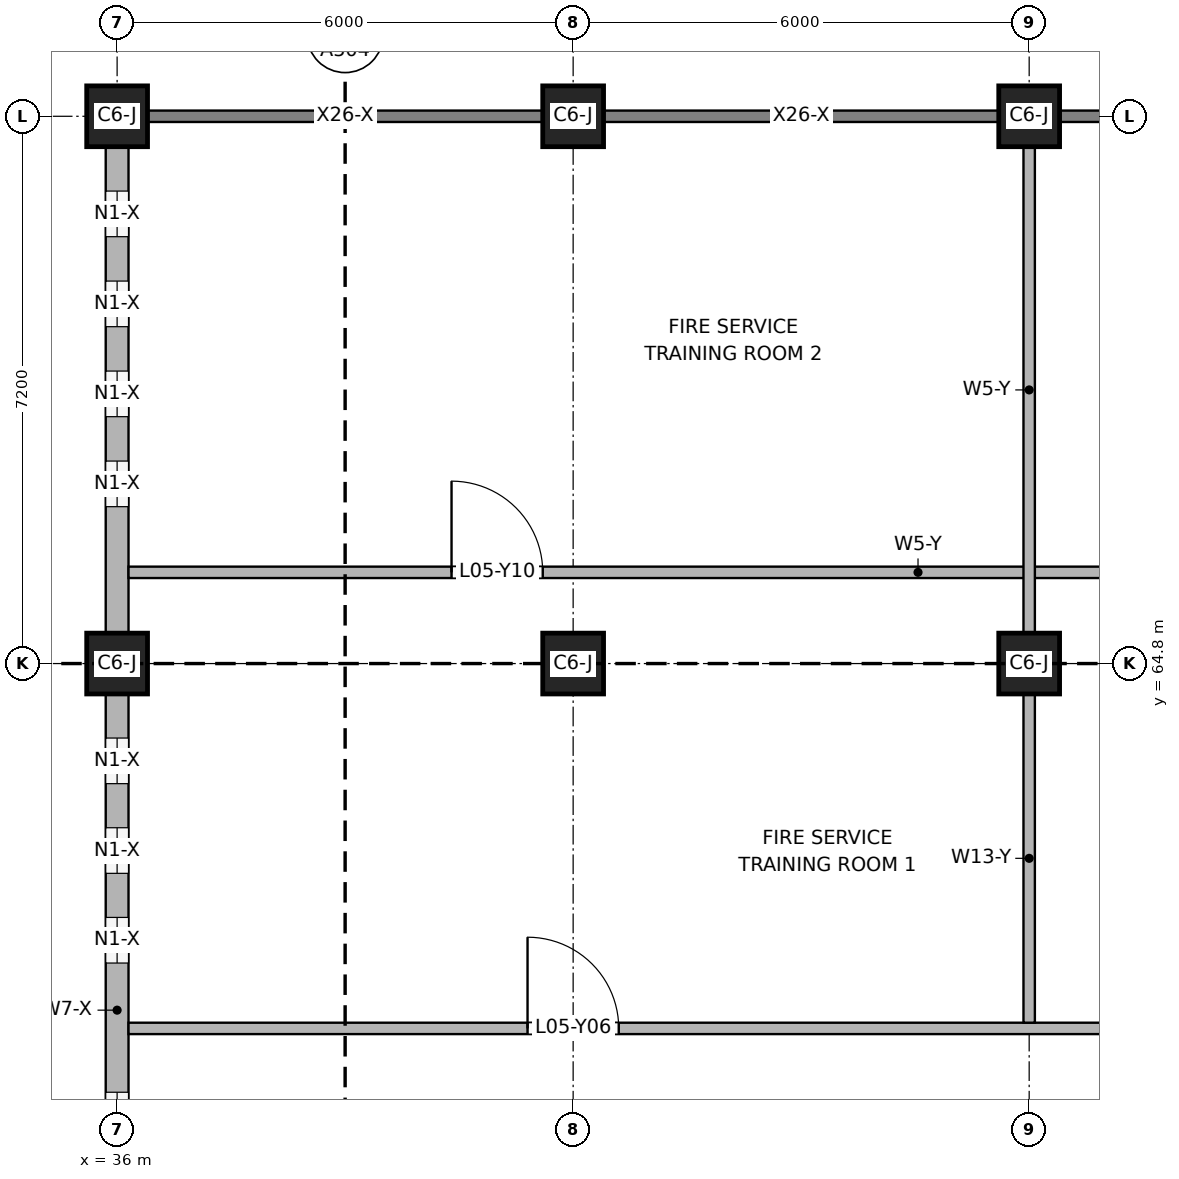
"""IFC4 building model, lengths in metres.
Left out: names, types, materials, properties, quantities, classifications, styles, units other than length and angle.
Written with IfcOpenShell. Run it as: python <this file> out.ifc"""

import sys

from ifc_helpers import new_model, si_unit, direction, frame, frame_2d, origin, origin_2d, place, context, subcontext, project, spatial, rectangle, extrude, element, fill, save


model = new_model("IFC4")
c1 = context("Model", 3, precision=1e-05, world=origin(), true_north=direction((0.0, 1.0)))
c2 = subcontext(c1, "Body", "Model", "MODEL_VIEW")
j1 = project(units=[si_unit("LENGTHUNIT", "METRE"), si_unit("PLANEANGLEUNIT", "RADIAN")], contexts=[c1])
p1 = place(None, origin())
s1 = spatial("IfcSite", under=j1, at=p1, CompositionType="ELEMENT")
p2 = place(p1, origin())
s2 = spatial("IfcBuilding", under=s1, at=p2, CompositionType="ELEMENT")
p3 = place(p2, frame((0.0, 0.0, 21.0)))
s3 = spatial("IfcBuildingStorey", under=s2, at=p3, CompositionType="ELEMENT", Elevation=21.0)
for number, where, z_axis, x_axis in (
    (1, (36.0, 64.8, 0.0), (0.0, 0.0, 1.0), (1.0, 0.0, 0.0)),
    (2, (42.0, 64.8, 0.0), (0.0, 0.0, 1.0), (1.0, 0.0, 0.0)),
    (3, (48.0, 64.8, 0.0), (0.0, 0.0, 1.0), (1.0, 0.0, 0.0)),
    (4, (36.0, 72.0, 0.0), (0.0, 0.0, 1.0), (1.0, 0.0, 0.0)),
    (5, (42.0, 72.0, 0.0), (0.0, 0.0, 1.0), (1.0, 0.0, 0.0)),
    (6, (48.0, 72.0, 0.0), (0.0, 0.0, 1.0), (1.0, 0.0, 0.0)),
):
    element("IfcColumn", number, at=place(p3, frame(where, z_axis=z_axis, x_axis=x_axis)), inside=s3, PredefinedType="COLUMN", context=c2, shape_type="SweptSolid", body=[
        extrude(rectangle(XDim=0.8, YDim=0.8, at=origin_2d()), origin(), (0.0, 0.0, 1.0), 3.95),
    ])
p4 = place(p3, frame((36.0, 58.0, 0.0), z_axis=(0.0, 0.0, 1.0), x_axis=(0.0, 1.0, 0.0)))
e7 = element("IfcWall", 7, at=p4, inside=s3, PredefinedType="SOLIDWALL", context=c2, shape_type="SweptSolid", body=[
    extrude(rectangle(XDim=6.4, YDim=0.3, at=frame_2d((3.2, 0.0))), origin(), (0.0, 0.0, 1.0), 3.15),
])
p5 = place(p4, frame((0.56, 0.0, 0.9)))
e8 = element("IfcOpeningElement", 8, at=p5, cuts=e7, PredefinedType="OPENING", context=c2, shape_type="SweptSolid", body=[
    extrude(rectangle(XDim=0.6, YDim=1.9, at=frame_2d((0.3, 0.95))), frame((0.0, 0.16, 0.0), z_axis=(0.0, -1.0, 0.0), x_axis=(1.0, 0.0, 0.0)), (0.0, 0.0, 1.0), 0.32),
])
p6 = place(p4, frame((2.86, 0.0, 0.9)))
e9 = element("IfcOpeningElement", 9, at=p6, cuts=e7, PredefinedType="OPENING", context=c2, shape_type="SweptSolid", body=[
    extrude(rectangle(XDim=0.6, YDim=1.9, at=frame_2d((0.3, 0.95))), frame((0.0, 0.16, 0.0), z_axis=(0.0, -1.0, 0.0), x_axis=(1.0, 0.0, 0.0)), (0.0, 0.0, 1.0), 0.32),
])
p7 = place(p4, frame((4.04, 0.0, 0.9)))
e10 = element("IfcOpeningElement", 10, at=p7, cuts=e7, PredefinedType="OPENING", context=c2, shape_type="SweptSolid", body=[
    extrude(rectangle(XDim=0.6, YDim=1.9, at=frame_2d((0.3, 0.95))), frame((0.0, 0.16, 0.0), z_axis=(0.0, -1.0, 0.0), x_axis=(1.0, 0.0, 0.0)), (0.0, 0.0, 1.0), 0.32),
])
p8 = place(p4, frame((5.22, 0.0, 0.9)))
e11 = element("IfcOpeningElement", 11, at=p8, cuts=e7, PredefinedType="OPENING", context=c2, shape_type="SweptSolid", body=[
    extrude(rectangle(XDim=0.6, YDim=1.9, at=frame_2d((0.3, 0.95))), frame((0.0, 0.16, 0.0), z_axis=(0.0, -1.0, 0.0), x_axis=(1.0, 0.0, 0.0)), (0.0, 0.0, 1.0), 0.32),
])
p9 = place(p3, frame((36.0, 65.2, 0.0), z_axis=(0.0, 0.0, 1.0), x_axis=(0.0, 1.0, 0.0)))
e12 = element("IfcWall", 12, at=p9, inside=s3, PredefinedType="SOLIDWALL", context=c2, shape_type="SweptSolid", body=[
    extrude(rectangle(XDim=6.4, YDim=0.3, at=frame_2d((3.2, 0.0))), origin(), (0.0, 0.0, 1.0), 3.15),
])
p10 = place(p9, frame((1.664, 0.0, 0.9)))
e13 = element("IfcOpeningElement", 13, at=p10, cuts=e12, PredefinedType="OPENING", context=c2, shape_type="SweptSolid", body=[
    extrude(rectangle(XDim=0.6, YDim=1.9, at=frame_2d((0.3, 0.95))), frame((0.0, 0.16, 0.0), z_axis=(0.0, -1.0, 0.0), x_axis=(1.0, 0.0, 0.0)), (0.0, 0.0, 1.0), 0.32),
])
p11 = place(p9, frame((2.848, 0.0, 0.9)))
e14 = element("IfcOpeningElement", 14, at=p11, cuts=e12, PredefinedType="OPENING", context=c2, shape_type="SweptSolid", body=[
    extrude(rectangle(XDim=0.6, YDim=1.9, at=frame_2d((0.3, 0.95))), frame((0.0, 0.16, 0.0), z_axis=(0.0, -1.0, 0.0), x_axis=(1.0, 0.0, 0.0)), (0.0, 0.0, 1.0), 0.32),
])
p12 = place(p9, frame((4.032, 0.0, 0.9)))
e15 = element("IfcOpeningElement", 15, at=p12, cuts=e12, PredefinedType="OPENING", context=c2, shape_type="SweptSolid", body=[
    extrude(rectangle(XDim=0.6, YDim=1.9, at=frame_2d((0.3, 0.95))), frame((0.0, 0.16, 0.0), z_axis=(0.0, -1.0, 0.0), x_axis=(1.0, 0.0, 0.0)), (0.0, 0.0, 1.0), 0.32),
])
p13 = place(p9, frame((5.216, 0.0, 0.9)))
e16 = element("IfcOpeningElement", 16, at=p13, cuts=e12, PredefinedType="OPENING", context=c2, shape_type="SweptSolid", body=[
    extrude(rectangle(XDim=0.6, YDim=1.9, at=frame_2d((0.3, 0.95))), frame((0.0, 0.16, 0.0), z_axis=(0.0, -1.0, 0.0), x_axis=(1.0, 0.0, 0.0)), (0.0, 0.0, 1.0), 0.32),
])
p14 = place(p3, frame((48.0, 60.075, 0.0), z_axis=(0.0, 0.0, 1.0), x_axis=(0.0, 1.0, 0.0)))
e17 = element("IfcWall", 17, at=p14, inside=s3, PredefinedType="PARTITIONING", context=c2, shape_type="SweptSolid", body=[
    extrude(rectangle(XDim=4.325, YDim=0.15, at=frame_2d((2.163, 0.0))), origin(), (0.0, 0.0, 1.0), 3.95),
])
p15 = place(p3, frame((48.0, 65.2, 0.0), z_axis=(0.0, 0.0, 1.0), x_axis=(0.0, 1.0, 0.0)))
e18 = element("IfcWall", 18, at=p15, inside=s3, PredefinedType="PARTITIONING", context=c2, shape_type="SweptSolid", body=[
    extrude(rectangle(XDim=6.4, YDim=0.15, at=frame_2d((3.2, 0.0))), origin(), (0.0, 0.0, 1.0), 3.15),
])
p16 = place(p3, frame((36.15, 60.0, 0.0), z_axis=(0.0, 0.0, 1.0), x_axis=(1.0, 0.0, 0.0)))
e19 = element("IfcWall", 19, at=p16, inside=s3, PredefinedType="PARTITIONING", context=c2, shape_type="SweptSolid", body=[
    extrude(rectangle(XDim=29.775, YDim=0.15, at=frame_2d((14.888, 0.0))), origin(), (0.0, 0.0, 1.0), 3.15),
])
p17 = place(p16, frame((5.25, 0.0, 0.0)))
e20 = element("IfcOpeningElement", 20, at=p17, cuts=e19, PredefinedType="OPENING", context=c2, shape_type="SweptSolid", body=[
    extrude(rectangle(XDim=1.2, YDim=2.1, at=frame_2d((0.6, 1.05))), frame((0.0, 0.085, 0.0), z_axis=(0.0, -1.0, 0.0), x_axis=(1.0, 0.0, 0.0)), (0.0, 0.0, 1.0), 0.17),
])
p18 = place(p16, frame((15.75, 0.0, 0.0)))
e21 = element("IfcOpeningElement", 21, at=p18, cuts=e19, PredefinedType="OPENING", context=c2, shape_type="SweptSolid", body=[
    extrude(rectangle(XDim=1.2, YDim=2.1, at=frame_2d((0.6, 1.05))), frame((0.0, 0.085, 0.0), z_axis=(0.0, -1.0, 0.0), x_axis=(1.0, 0.0, 0.0)), (0.0, 0.0, 1.0), 0.17),
])
p19 = place(p16, frame((24.75, 0.0, 0.0)))
e22 = element("IfcOpeningElement", 22, at=p19, cuts=e19, PredefinedType="OPENING", context=c2, shape_type="SweptSolid", body=[
    extrude(rectangle(XDim=1.2, YDim=2.1, at=frame_2d((0.6, 1.05))), frame((0.0, 0.085, 0.0), z_axis=(0.0, -1.0, 0.0), x_axis=(1.0, 0.0, 0.0)), (0.0, 0.0, 1.0), 0.17),
])
p20 = place(p3, frame((36.15, 66.0, 0.0), z_axis=(0.0, 0.0, 1.0), x_axis=(1.0, 0.0, 0.0)))
e23 = element("IfcWall", 23, at=p20, inside=s3, PredefinedType="PARTITIONING", context=c2, shape_type="SweptSolid", body=[
    extrude(rectangle(XDim=20.775, YDim=0.15, at=frame_2d((10.388, 0.0))), origin(), (0.0, 0.0, 1.0), 3.15),
])
p21 = place(p20, frame((4.25, 0.0, 0.0)))
e24 = element("IfcOpeningElement", 24, at=p21, cuts=e23, PredefinedType="OPENING", context=c2, shape_type="SweptSolid", body=[
    extrude(rectangle(XDim=1.2, YDim=2.1, at=frame_2d((0.6, 1.05))), frame((0.0, 0.085, 0.0), z_axis=(0.0, -1.0, 0.0), x_axis=(1.0, 0.0, 0.0)), (0.0, 0.0, 1.0), 0.17),
])
p22 = place(p20, frame((15.75, 0.0, 0.0)))
e25 = element("IfcOpeningElement", 25, at=p22, cuts=e23, PredefinedType="OPENING", context=c2, shape_type="SweptSolid", body=[
    extrude(rectangle(XDim=1.2, YDim=2.1, at=frame_2d((0.6, 1.05))), frame((0.0, 0.085, 0.0), z_axis=(0.0, -1.0, 0.0), x_axis=(1.0, 0.0, 0.0)), (0.0, 0.0, 1.0), 0.17),
])
p23 = place(p5, origin())
e26 = element("IfcWindow", 26, at=p23, inside=s3, PartitioningType="SINGLE_PANEL", PredefinedType="WINDOW", context=c2, shape_type="SweptSolid", body=[
    extrude(rectangle(XDim=0.6, YDim=1.9, at=frame_2d((0.3, 0.95))), frame((0.0, 0.03, 0.0), z_axis=(0.0, -1.0, 0.0), x_axis=(1.0, 0.0, 0.0)), (0.0, 0.0, 1.0), 0.06),
])
fill(e8, e26)
p24 = place(p6, origin())
e27 = element("IfcWindow", 27, at=p24, inside=s3, PartitioningType="SINGLE_PANEL", PredefinedType="WINDOW", context=c2, shape_type="SweptSolid", body=[
    extrude(rectangle(XDim=0.6, YDim=1.9, at=frame_2d((0.3, 0.95))), frame((0.0, 0.03, 0.0), z_axis=(0.0, -1.0, 0.0), x_axis=(1.0, 0.0, 0.0)), (0.0, 0.0, 1.0), 0.06),
])
fill(e9, e27)
p25 = place(p7, origin())
e28 = element("IfcWindow", 28, at=p25, inside=s3, PartitioningType="SINGLE_PANEL", PredefinedType="WINDOW", context=c2, shape_type="SweptSolid", body=[
    extrude(rectangle(XDim=0.6, YDim=1.9, at=frame_2d((0.3, 0.95))), frame((0.0, 0.03, 0.0), z_axis=(0.0, -1.0, 0.0), x_axis=(1.0, 0.0, 0.0)), (0.0, 0.0, 1.0), 0.06),
])
fill(e10, e28)
p26 = place(p8, origin())
e29 = element("IfcWindow", 29, at=p26, inside=s3, PartitioningType="SINGLE_PANEL", PredefinedType="WINDOW", context=c2, shape_type="SweptSolid", body=[
    extrude(rectangle(XDim=0.6, YDim=1.9, at=frame_2d((0.3, 0.95))), frame((0.0, 0.03, 0.0), z_axis=(0.0, -1.0, 0.0), x_axis=(1.0, 0.0, 0.0)), (0.0, 0.0, 1.0), 0.06),
])
fill(e11, e29)
p27 = place(p10, origin())
e30 = element("IfcWindow", 30, at=p27, inside=s3, PartitioningType="SINGLE_PANEL", PredefinedType="WINDOW", context=c2, shape_type="SweptSolid", body=[
    extrude(rectangle(XDim=0.6, YDim=1.9, at=frame_2d((0.3, 0.95))), frame((0.0, 0.03, 0.0), z_axis=(0.0, -1.0, 0.0), x_axis=(1.0, 0.0, 0.0)), (0.0, 0.0, 1.0), 0.06),
])
fill(e13, e30)
p28 = place(p11, origin())
e31 = element("IfcWindow", 31, at=p28, inside=s3, PartitioningType="SINGLE_PANEL", PredefinedType="WINDOW", context=c2, shape_type="SweptSolid", body=[
    extrude(rectangle(XDim=0.6, YDim=1.9, at=frame_2d((0.3, 0.95))), frame((0.0, 0.03, 0.0), z_axis=(0.0, -1.0, 0.0), x_axis=(1.0, 0.0, 0.0)), (0.0, 0.0, 1.0), 0.06),
])
fill(e14, e31)
p29 = place(p12, origin())
e32 = element("IfcWindow", 32, at=p29, inside=s3, PartitioningType="SINGLE_PANEL", PredefinedType="WINDOW", context=c2, shape_type="SweptSolid", body=[
    extrude(rectangle(XDim=0.6, YDim=1.9, at=frame_2d((0.3, 0.95))), frame((0.0, 0.03, 0.0), z_axis=(0.0, -1.0, 0.0), x_axis=(1.0, 0.0, 0.0)), (0.0, 0.0, 1.0), 0.06),
])
fill(e15, e32)
p30 = place(p13, origin())
e33 = element("IfcWindow", 33, at=p30, inside=s3, PartitioningType="SINGLE_PANEL", PredefinedType="WINDOW", context=c2, shape_type="SweptSolid", body=[
    extrude(rectangle(XDim=0.6, YDim=1.9, at=frame_2d((0.3, 0.95))), frame((0.0, 0.03, 0.0), z_axis=(0.0, -1.0, 0.0), x_axis=(1.0, 0.0, 0.0)), (0.0, 0.0, 1.0), 0.06),
])
fill(e16, e33)
p31 = place(p17, origin())
e34 = element("IfcDoor", 34, at=p31, inside=s3, OperationType="SINGLE_SWING_LEFT", PredefinedType="DOOR", context=c2, shape_type="SweptSolid", body=[
    extrude(rectangle(XDim=1.2, YDim=2.1, at=frame_2d((0.6, 1.05))), frame((0.0, 0.025, 0.0), z_axis=(0.0, -1.0, 0.0), x_axis=(1.0, 0.0, 0.0)), (0.0, 0.0, 1.0), 0.05),
])
fill(e20, e34)
p32 = place(p21, origin())
e35 = element("IfcDoor", 35, at=p32, inside=s3, OperationType="SINGLE_SWING_LEFT", PredefinedType="DOOR", context=c2, shape_type="SweptSolid", body=[
    extrude(rectangle(XDim=1.2, YDim=2.1, at=frame_2d((0.6, 1.05))), frame((0.0, 0.025, 0.0), z_axis=(0.0, -1.0, 0.0), x_axis=(1.0, 0.0, 0.0)), (0.0, 0.0, 1.0), 0.05),
])
fill(e24, e35)
save(model, sys.argv[1])
